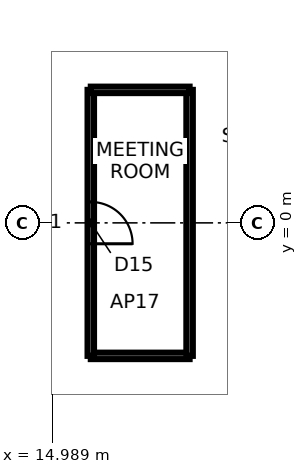
"""IFC4 building model, lengths in metres.
Left out: names, types, materials, properties, quantities, classifications, styles, units other than length and angle.
Written with IfcOpenShell. Run it as: python <this file> out.ifc"""

import sys

from ifc_helpers import new_model, si_unit, direction, frame, frame_2d, origin, place, context, subcontext, project, spatial, rectangle, extrude, element, fill, save


model = new_model("IFC4")
c1 = context("Model", 3, precision=1e-05, world=origin(), true_north=direction((0.0, 1.0)))
c2 = subcontext(c1, "Body", "Model", "MODEL_VIEW")
j1 = project(units=[si_unit("LENGTHUNIT", "METRE"), si_unit("PLANEANGLEUNIT", "RADIAN")], contexts=[c1])
p1 = place(None, origin())
s1 = spatial("IfcSite", under=j1, at=p1, CompositionType="ELEMENT")
p2 = place(p1, origin())
s2 = spatial("IfcBuilding", under=s1, at=p2, CompositionType="ELEMENT")
p3 = place(p2, frame((0.0, 0.0, 187.7)))
s3 = spatial("IfcBuildingStorey", under=s2, at=p3, CompositionType="ELEMENT", Elevation=187.7)
p4 = place(p3, frame((18.6, -3.5, 0.0), z_axis=(0.0, 0.0, 1.0), x_axis=(-1.0, 0.0, 0.0)))
e1 = element("IfcWall", 1, at=p4, inside=s3, PredefinedType="PARTITIONING", context=c2, shape_type="SweptSolid", body=[
    extrude(rectangle(XDim=2.6, YDim=0.17, at=frame_2d((1.3, 0.0))), origin(), (0.0, 0.0, 1.0), 3.74),
])
p5 = place(p3, frame((16.0, -3.5, 0.0), z_axis=(0.0, 0.0, 1.0), x_axis=(0.0, 1.0, 0.0)))
e2 = element("IfcWall", 2, at=p5, inside=s3, PredefinedType="PARTITIONING", context=c2, shape_type="SweptSolid", body=[
    extrude(rectangle(XDim=7.0, YDim=0.17, at=frame_2d((3.5, 0.0))), origin(), (0.0, 0.0, 1.0), 3.74),
])
p6 = place(p5, frame((2.95, 0.0, 0.0)))
e3 = element("IfcOpeningElement", 3, at=p6, cuts=e2, PredefinedType="OPENING", context=c2, shape_type="SweptSolid", body=[
    extrude(rectangle(XDim=1.1, YDim=2.4, at=frame_2d((0.55, 1.2))), frame((0.0, 0.095, 0.0), z_axis=(0.0, -1.0, 0.0), x_axis=(1.0, 0.0, 0.0)), (0.0, 0.0, 1.0), 0.19),
])
p7 = place(p3, frame((18.6, 3.5, 0.0), z_axis=(0.0, 0.0, 1.0), x_axis=(0.0, -1.0, 0.0)))
e4 = element("IfcWall", 4, at=p7, inside=s3, PredefinedType="PARTITIONING", context=c2, shape_type="SweptSolid", body=[
    extrude(rectangle(XDim=7.0, YDim=0.17, at=frame_2d((3.5, 0.0))), origin(), (0.0, 0.0, 1.0), 3.334),
])
p8 = place(p3, frame((16.0, 3.5, 0.0), z_axis=(0.0, 0.0, 1.0), x_axis=(1.0, 0.0, 0.0)))
e5 = element("IfcWall", 5, at=p8, inside=s3, PredefinedType="PARTITIONING", context=c2, shape_type="SweptSolid", body=[
    extrude(rectangle(XDim=2.6, YDim=0.17, at=frame_2d((1.3, 0.0))), origin(), (0.0, 0.0, 1.0), 3.74),
])
p9 = place(p6, frame((1.1, 0.0, 0.0), z_axis=(0.0, 0.0, 1.0), x_axis=(-1.0, 0.0, 0.0)))
e6 = element("IfcDoor", 6, at=p9, inside=s3, OperationType="SINGLE_SWING_RIGHT", PredefinedType="DOOR", context=c2, shape_type="SweptSolid", body=[
    extrude(rectangle(XDim=1.1, YDim=2.4, at=frame_2d((0.55, 1.2))), frame((0.0, 0.025, 0.0), z_axis=(0.0, -1.0, 0.0), x_axis=(1.0, 0.0, 0.0)), (0.0, 0.0, 1.0), 0.05),
])
fill(e3, e6)
save(model, sys.argv[1])
